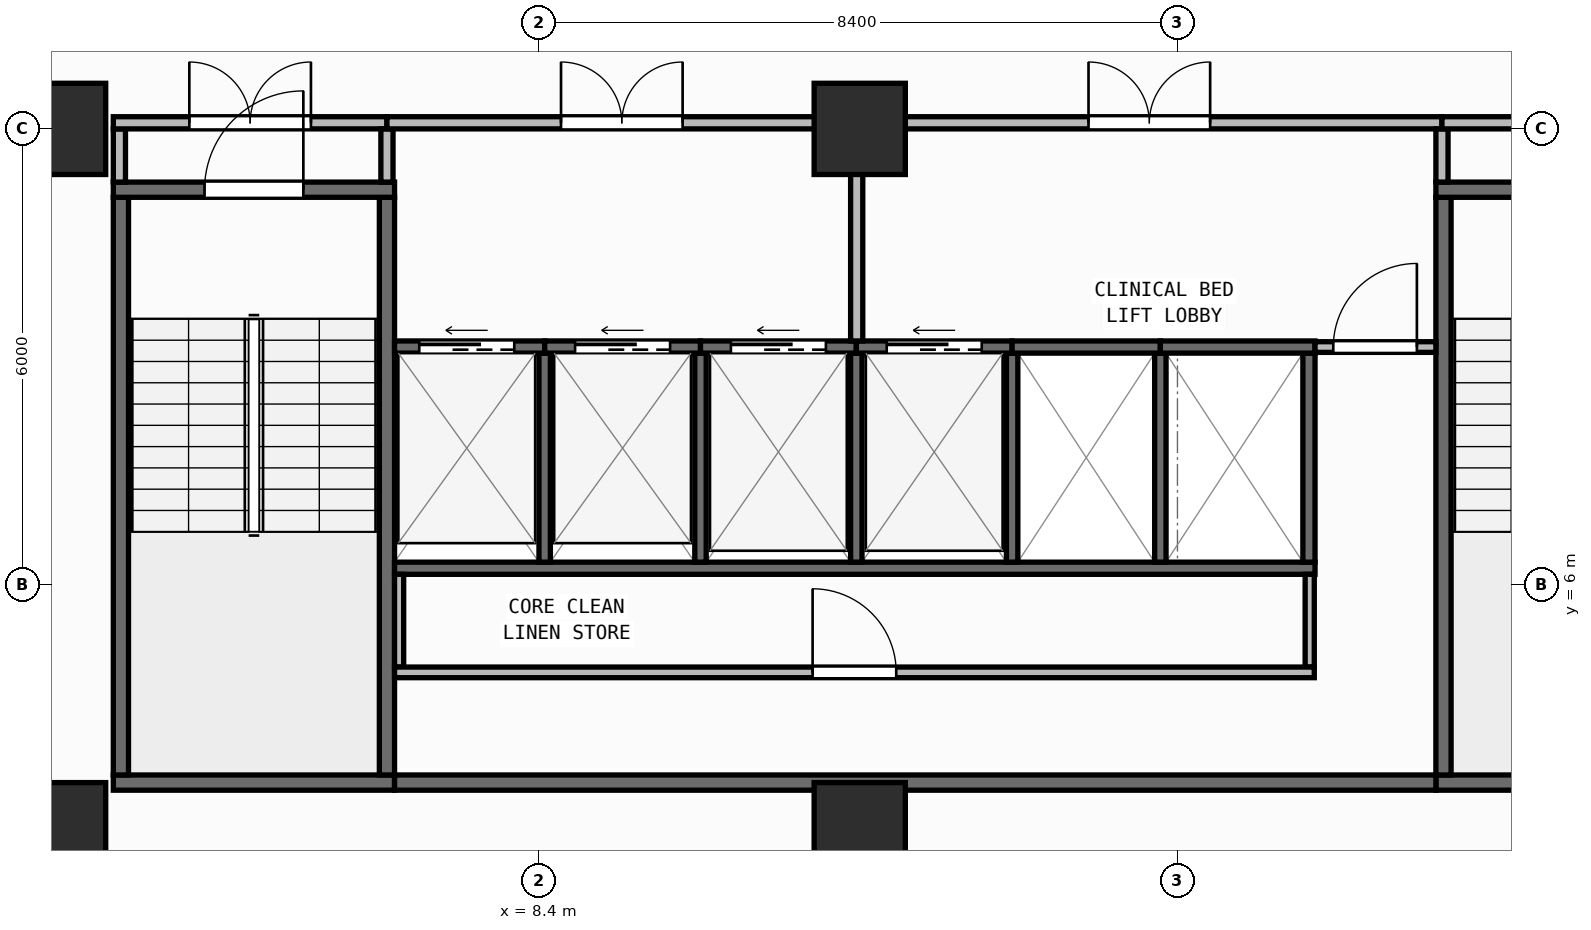
"""IFC4 building model, lengths in metres.
Left out: names, types, materials, properties, quantities, classifications, styles, units other than length and angle.
Written with IfcOpenShell. Run it as: python <this file> out.ifc"""

import sys

from ifc_helpers import new_model, si_unit, direction, frame, frame_2d, origin, origin_2d, place, context, subcontext, project, spatial, rectangle, extrude, element, fill, save


model = new_model("IFC4")
c1 = context("Model", 3, precision=1e-05, world=origin(), true_north=direction((0.0, 1.0)))
c2 = subcontext(c1, "Body", "Model", "MODEL_VIEW")
j1 = project(units=[si_unit("LENGTHUNIT", "METRE"), si_unit("PLANEANGLEUNIT", "RADIAN")], contexts=[c1])
p1 = place(None, origin())
s1 = spatial("IfcSite", under=j1, at=p1, CompositionType="ELEMENT")
p2 = place(p1, origin())
s2 = spatial("IfcBuilding", under=s1, at=p2, CompositionType="ELEMENT")
p3 = place(p2, frame((0.0, 0.0, 158.65)))
s3 = spatial("IfcBuildingStorey", under=s2, at=p3, CompositionType="ELEMENT", Elevation=158.65)
for number, where, z_axis, x_axis in (
    (1, (2.1, 2.8, 0.0), (0.0, 0.0, 1.0), (1.0, 0.0, 0.0)),
    (2, (12.62, 2.8, 0.0), (0.0, 0.0, 1.0), (1.0, 0.0, 0.0)),
    (3, (2.1, 12.0, 0.0), (0.0, 0.0, 1.0), (1.0, 0.0, 0.0)),
    (4, (12.62, 12.0, 0.0), (0.0, 0.0, 1.0), (1.0, 0.0, 0.0)),
):
    element("IfcColumn", number, at=place(p3, frame(where, z_axis=z_axis, x_axis=x_axis)), inside=s3, PredefinedType="COLUMN", context=c2, shape_type="SweptSolid", body=[
        extrude(rectangle(XDim=1.2, YDim=1.2, at=origin_2d()), origin(), (0.0, 0.0, 1.0), 3.95),
    ])
p4 = place(p3, frame((2.76, 0.173, 0.0), z_axis=(0.0, 0.0, 1.0), x_axis=(0.996857931723, 0.079210251617, 0.0)))
e5 = element("IfcWall", 5, at=p4, inside=s3, PredefinedType="STANDARD", context=c2, shape_type="SweptSolid", body=[
    extrude(rectangle(XDim=51.442, YDim=0.26, at=frame_2d((25.721, 0.0))), origin(), (0.0, 0.0, 1.0), 3.71),
])
p5 = place(p4, frame((24.521, 0.0, 0.9)))
e6 = element("IfcOpeningElement", 6, at=p5, cuts=e5, PredefinedType="OPENING", context=c2, shape_type="SweptSolid", body=[
    extrude(rectangle(XDim=2.4, YDim=1.65, at=frame_2d((1.2, 0.825))), frame((0.0, 0.14, 0.0), z_axis=(0.0, -1.0, 0.0), x_axis=(1.0, 0.0, 0.0)), (0.0, 0.0, 1.0), 0.28),
])
p6 = place(p3, frame((2.8, 3.4, 0.0), z_axis=(0.0, 0.0, 1.0), x_axis=(1.0, 0.0, 0.0)))
e7 = element("IfcWall", 7, at=p6, inside=s3, PredefinedType="SHEAR", context=c2, shape_type="SweptSolid", body=[
    extrude(rectangle(XDim=3.7, YDim=0.2, at=frame_2d((1.85, 0.0))), origin(), (0.0, 0.0, 1.0), 3.71),
])
for number, where, z_axis, x_axis in (
    (8, (2.9, 3.5, 0.0), (0.0, 0.0, 1.0), (0.0, 1.0, 0.0)),
    (9, (6.4, 3.5, 0.0), (0.0, 0.0, 1.0), (0.0, 1.0, 0.0)),
):
    element("IfcWall", number, at=place(p3, frame(where, z_axis=z_axis, x_axis=x_axis)), inside=s3, PredefinedType="SHEAR", context=c2, shape_type="SweptSolid", body=[
        extrude(rectangle(XDim=7.6, YDim=0.2, at=frame_2d((3.8, 0.0))), origin(), (0.0, 0.0, 1.0), 3.71),
    ])
p7 = place(p3, frame((2.8, 11.2, 0.0), z_axis=(0.0, 0.0, 1.0), x_axis=(1.0, 0.0, 0.0)))
e10 = element("IfcWall", 10, at=p7, inside=s3, PredefinedType="SHEAR", context=c2, shape_type="SweptSolid", body=[
    extrude(rectangle(XDim=3.7, YDim=0.2, at=frame_2d((1.85, 0.0))), origin(), (0.0, 0.0, 1.0), 3.71),
])
p8 = place(p7, frame((1.2, 0.0, 0.0)))
e11 = element("IfcOpeningElement", 11, at=p8, cuts=e10, PredefinedType="OPENING", context=c2, shape_type="SweptSolid", body=[
    extrude(rectangle(XDim=1.3, YDim=2.15, at=frame_2d((0.65, 1.075))), frame((0.0, 0.11, 0.0), z_axis=(0.0, -1.0, 0.0), x_axis=(1.0, 0.0, 0.0)), (0.0, 0.0, 1.0), 0.22),
])
p9 = place(p3, frame((20.2, 3.4, 0.0), z_axis=(0.0, 0.0, 1.0), x_axis=(1.0, 0.0, 0.0)))
e12 = element("IfcWall", 12, at=p9, inside=s3, PredefinedType="SHEAR", context=c2, shape_type="SweptSolid", body=[
    extrude(rectangle(XDim=3.7, YDim=0.2, at=frame_2d((1.85, 0.0))), origin(), (0.0, 0.0, 1.0), 3.71),
])
p10 = place(p3, frame((20.3, 3.5, 0.0), z_axis=(0.0, 0.0, 1.0), x_axis=(0.0, 1.0, 0.0)))
e13 = element("IfcWall", 13, at=p10, inside=s3, PredefinedType="SHEAR", context=c2, shape_type="SweptSolid", body=[
    extrude(rectangle(XDim=7.6, YDim=0.2, at=frame_2d((3.8, 0.0))), origin(), (0.0, 0.0, 1.0), 3.71),
])
p11 = place(p3, frame((20.2, 11.2, 0.0), z_axis=(0.0, 0.0, 1.0), x_axis=(1.0, 0.0, 0.0)))
e14 = element("IfcWall", 14, at=p11, inside=s3, PredefinedType="SHEAR", context=c2, shape_type="SweptSolid", body=[
    extrude(rectangle(XDim=3.7, YDim=0.2, at=frame_2d((1.85, 0.0))), origin(), (0.0, 0.0, 1.0), 3.71),
])
p12 = place(p11, frame((1.2, 0.0, 0.0)))
e15 = element("IfcOpeningElement", 15, at=p12, cuts=e14, PredefinedType="OPENING", context=c2, shape_type="SweptSolid", body=[
    extrude(rectangle(XDim=1.3, YDim=2.15, at=frame_2d((0.65, 1.075))), frame((0.0, 0.11, 0.0), z_axis=(0.0, -1.0, 0.0), x_axis=(1.0, 0.0, 0.0)), (0.0, 0.0, 1.0), 0.22),
])
p13 = place(p3, frame((6.5, 3.4, 0.0), z_axis=(0.0, 0.0, 1.0), x_axis=(1.0, 0.0, 0.0)))
e16 = element("IfcWall", 16, at=p13, inside=s3, PredefinedType="SHEAR", context=c2, shape_type="SweptSolid", body=[
    extrude(rectangle(XDim=13.7, YDim=0.2, at=frame_2d((6.85, 0.0))), origin(), (0.0, 0.0, 1.0), 3.71),
])
p14 = place(p3, frame((6.5, 6.22, 0.0), z_axis=(0.0, 0.0, 1.0), x_axis=(1.0, 0.0, 0.0)))
e17 = element("IfcWall", 17, at=p14, inside=s3, PredefinedType="SHEAR", context=c2, shape_type="SweptSolid", body=[
    extrude(rectangle(XDim=12.11, YDim=0.16, at=frame_2d((6.055, 0.0))), origin(), (0.0, 0.0, 1.0), 3.71),
])
p15 = place(p3, frame((18.53, 6.3, 0.0), z_axis=(0.0, 0.0, 1.0), x_axis=(0.0, 1.0, 0.0)))
e18 = element("IfcWall", 18, at=p15, inside=s3, PredefinedType="SHEAR", context=c2, shape_type="SweptSolid", body=[
    extrude(rectangle(XDim=2.75, YDim=0.16, at=frame_2d((1.375, 0.0))), origin(), (0.0, 0.0, 1.0), 3.71),
])
for number, where, z_axis, x_axis in (
    (19, (8.475, 6.3, 0.0), (0.0, 0.0, 1.0), (0.0, 1.0, 0.0)),
    (20, (10.525, 6.3, 0.0), (0.0, 0.0, 1.0), (0.0, 1.0, 0.0)),
    (21, (12.575, 6.3, 0.0), (0.0, 0.0, 1.0), (0.0, 1.0, 0.0)),
    (22, (14.625, 6.3, 0.0), (0.0, 0.0, 1.0), (0.0, 1.0, 0.0)),
    (23, (16.575, 6.3, 0.0), (0.0, 0.0, 1.0), (0.0, 1.0, 0.0)),
):
    element("IfcWall", number, at=place(p3, frame(where, z_axis=z_axis, x_axis=x_axis)), inside=s3, PredefinedType="SHEAR", context=c2, shape_type="SweptSolid", body=[
        extrude(rectangle(XDim=2.75, YDim=0.15, at=frame_2d((1.375, 0.0))), origin(), (0.0, 0.0, 1.0), 3.71),
    ])
p16 = place(p3, frame((6.5, 9.13, 0.0), z_axis=(0.0, 0.0, 1.0), x_axis=(1.0, 0.0, 0.0)))
e24 = element("IfcWall", 24, at=p16, inside=s3, PredefinedType="SHEAR", context=c2, shape_type="SweptSolid", body=[
    extrude(rectangle(XDim=1.975, YDim=0.16, at=frame_2d((0.988, 0.0))), origin(), (0.0, 0.0, 1.0), 3.71),
])
p17 = place(p16, frame((0.325, 0.0, 0.0)))
e25 = element("IfcOpeningElement", 25, at=p17, cuts=e24, PredefinedType="OPENING", context=c2, shape_type="SweptSolid", body=[
    extrude(rectangle(XDim=1.25, YDim=2.15, at=frame_2d((0.625, 1.075))), frame((0.0, 0.09, 0.0), z_axis=(0.0, -1.0, 0.0), x_axis=(1.0, 0.0, 0.0)), (0.0, 0.0, 1.0), 0.18),
])
p18 = place(p3, frame((8.475, 9.13, 0.0), z_axis=(0.0, 0.0, 1.0), x_axis=(1.0, 0.0, 0.0)))
e26 = element("IfcWall", 26, at=p18, inside=s3, PredefinedType="SHEAR", context=c2, shape_type="SweptSolid", body=[
    extrude(rectangle(XDim=2.05, YDim=0.16, at=frame_2d((1.025, 0.0))), origin(), (0.0, 0.0, 1.0), 3.71),
])
p19 = place(p18, frame((0.4, 0.0, 0.0)))
e27 = element("IfcOpeningElement", 27, at=p19, cuts=e26, PredefinedType="OPENING", context=c2, shape_type="SweptSolid", body=[
    extrude(rectangle(XDim=1.25, YDim=2.15, at=frame_2d((0.625, 1.075))), frame((0.0, 0.09, 0.0), z_axis=(0.0, -1.0, 0.0), x_axis=(1.0, 0.0, 0.0)), (0.0, 0.0, 1.0), 0.18),
])
p20 = place(p3, frame((10.525, 9.13, 0.0), z_axis=(0.0, 0.0, 1.0), x_axis=(1.0, 0.0, 0.0)))
e28 = element("IfcWall", 28, at=p20, inside=s3, PredefinedType="SHEAR", context=c2, shape_type="SweptSolid", body=[
    extrude(rectangle(XDim=2.05, YDim=0.16, at=frame_2d((1.025, 0.0))), origin(), (0.0, 0.0, 1.0), 3.71),
])
p21 = place(p20, frame((0.4, 0.0, 0.0)))
e29 = element("IfcOpeningElement", 29, at=p21, cuts=e28, PredefinedType="OPENING", context=c2, shape_type="SweptSolid", body=[
    extrude(rectangle(XDim=1.25, YDim=2.15, at=frame_2d((0.625, 1.075))), frame((0.0, 0.09, 0.0), z_axis=(0.0, -1.0, 0.0), x_axis=(1.0, 0.0, 0.0)), (0.0, 0.0, 1.0), 0.18),
])
p22 = place(p3, frame((12.575, 9.13, 0.0), z_axis=(0.0, 0.0, 1.0), x_axis=(1.0, 0.0, 0.0)))
e30 = element("IfcWall", 30, at=p22, inside=s3, PredefinedType="SHEAR", context=c2, shape_type="SweptSolid", body=[
    extrude(rectangle(XDim=2.05, YDim=0.16, at=frame_2d((1.025, 0.0))), origin(), (0.0, 0.0, 1.0), 3.71),
])
p23 = place(p22, frame((0.4, 0.0, 0.0)))
e31 = element("IfcOpeningElement", 31, at=p23, cuts=e30, PredefinedType="OPENING", context=c2, shape_type="SweptSolid", body=[
    extrude(rectangle(XDim=1.25, YDim=2.15, at=frame_2d((0.625, 1.075))), frame((0.0, 0.09, 0.0), z_axis=(0.0, -1.0, 0.0), x_axis=(1.0, 0.0, 0.0)), (0.0, 0.0, 1.0), 0.18),
])
p24 = place(p3, frame((14.625, 9.13, 0.0), z_axis=(0.0, 0.0, 1.0), x_axis=(1.0, 0.0, 0.0)))
e32 = element("IfcWall", 32, at=p24, inside=s3, PredefinedType="SHEAR", context=c2, shape_type="SweptSolid", body=[
    extrude(rectangle(XDim=1.95, YDim=0.16, at=frame_2d((0.975, 0.0))), origin(), (0.0, 0.0, 1.0), 3.71),
])
p25 = place(p3, frame((16.575, 9.13, 0.0), z_axis=(0.0, 0.0, 1.0), x_axis=(1.0, 0.0, 0.0)))
e33 = element("IfcWall", 33, at=p25, inside=s3, PredefinedType="SHEAR", context=c2, shape_type="SweptSolid", body=[
    extrude(rectangle(XDim=2.035, YDim=0.16, at=frame_2d((1.018, 0.0))), origin(), (0.0, 0.0, 1.0), 3.71),
])
for number, where, z_axis, x_axis in (
    (34, (6.56, 4.92, 0.0), (0.0, 0.0, 1.0), (0.0, 1.0, 0.0)),
    (35, (18.54, 4.92, 0.0), (0.0, 0.0, 1.0), (0.0, 1.0, 0.0)),
):
    element("IfcWall", number, at=place(p3, frame(where, z_axis=z_axis, x_axis=x_axis)), inside=s3, PredefinedType="PARTITIONING", context=c2, shape_type="SweptSolid", body=[
        extrude(rectangle(XDim=1.22, YDim=0.12, at=frame_2d((0.61, 0.0))), origin(), (0.0, 0.0, 1.0), 3.71),
    ])
p26 = place(p3, frame((6.5, 4.85, 0.0), z_axis=(0.0, 0.0, 1.0), x_axis=(1.0, 0.0, 0.0)))
e36 = element("IfcWall", 36, at=p26, inside=s3, PredefinedType="PARTITIONING", context=c2, shape_type="SweptSolid", body=[
    extrude(rectangle(XDim=12.1, YDim=0.14, at=frame_2d((6.05, 0.0))), origin(), (0.0, 0.0, 1.0), 3.71),
])
p27 = place(p26, frame((5.5, 0.0, 0.0)))
e37 = element("IfcOpeningElement", 37, at=p27, cuts=e36, PredefinedType="OPENING", context=c2, shape_type="SweptSolid", body=[
    extrude(rectangle(XDim=1.1, YDim=2.1, at=frame_2d((0.55, 1.05))), frame((0.0, 0.08, 0.0), z_axis=(0.0, -1.0, 0.0), x_axis=(1.0, 0.0, 0.0)), (0.0, 0.0, 1.0), 0.16),
])
p28 = place(p3, frame((18.61, 9.13, 0.0), z_axis=(0.0, 0.0, 1.0), x_axis=(1.0, 0.0, 0.0)))
e38 = element("IfcWall", 38, at=p28, inside=s3, PredefinedType="PARTITIONING", context=c2, shape_type="SweptSolid", body=[
    extrude(rectangle(XDim=1.59, YDim=0.14, at=frame_2d((0.795, 0.0))), origin(), (0.0, 0.0, 1.0), 3.71),
])
p29 = place(p28, frame((0.24, 0.0, 0.0)))
e39 = element("IfcOpeningElement", 39, at=p29, cuts=e38, PredefinedType="OPENING", context=c2, shape_type="SweptSolid", body=[
    extrude(rectangle(XDim=1.1, YDim=2.1, at=frame_2d((0.55, 1.05))), frame((0.0, 0.08, 0.0), z_axis=(0.0, -1.0, 0.0), x_axis=(1.0, 0.0, 0.0)), (0.0, 0.0, 1.0), 0.16),
])
p30 = place(p3, frame((2.88, 11.3, 0.0), z_axis=(0.0, 0.0, 1.0), x_axis=(0.0, 1.0, 0.0)))
e40 = element("IfcWall", 40, at=p30, inside=s3, PredefinedType="PARTITIONING", context=c2, shape_type="SweptSolid", body=[
    extrude(rectangle(XDim=0.7, YDim=0.16, at=frame_2d((0.35, 0.0))), origin(), (0.0, 0.0, 1.0), 3.71),
])
p31 = place(p3, frame((2.8, 12.08, 0.0), z_axis=(0.0, 0.0, 1.0), x_axis=(1.0, 0.0, 0.0)))
e41 = element("IfcWall", 41, at=p31, inside=s3, PredefinedType="PARTITIONING", context=c2, shape_type="SweptSolid", body=[
    extrude(rectangle(XDim=3.6, YDim=0.16, at=frame_2d((1.8, 0.0))), origin(), (0.0, 0.0, 1.0), 3.083),
])
p32 = place(p31, frame((1.0, 0.0, 0.0)))
e42 = element("IfcOpeningElement", 42, at=p32, cuts=e41, PredefinedType="OPENING", context=c2, shape_type="SweptSolid", body=[
    extrude(rectangle(XDim=1.6, YDim=2.05, at=frame_2d((0.8, 1.025))), frame((0.0, 0.09, 0.0), z_axis=(0.0, -1.0, 0.0), x_axis=(1.0, 0.0, 0.0)), (0.0, 0.0, 1.0), 0.18),
])
p33 = place(p3, frame((6.4, 11.3, 0.0), z_axis=(0.0, 0.0, 1.0), x_axis=(0.0, 1.0, 0.0)))
e43 = element("IfcWall", 43, at=p33, inside=s3, PredefinedType="PARTITIONING", context=c2, shape_type="SweptSolid", body=[
    extrude(rectangle(XDim=0.7, YDim=0.16, at=frame_2d((0.35, 0.0))), origin(), (0.0, 0.0, 1.0), 3.71),
])
p34 = place(p3, frame((6.4, 12.08, 0.0), z_axis=(0.0, 0.0, 1.0), x_axis=(1.0, 0.0, 0.0)))
e44 = element("IfcWall", 44, at=p34, inside=s3, PredefinedType="PARTITIONING", context=c2, shape_type="SweptSolid", body=[
    extrude(rectangle(XDim=6.18, YDim=0.16, at=frame_2d((3.09, 0.0))), origin(), (0.0, 0.0, 1.0), 3.083),
])
p35 = place(p34, frame((2.29, 0.0, 0.0)))
e45 = element("IfcOpeningElement", 45, at=p35, cuts=e44, PredefinedType="OPENING", context=c2, shape_type="SweptSolid", body=[
    extrude(rectangle(XDim=1.6, YDim=2.05, at=frame_2d((0.8, 1.025))), frame((0.0, 0.09, 0.0), z_axis=(0.0, -1.0, 0.0), x_axis=(1.0, 0.0, 0.0)), (0.0, 0.0, 1.0), 0.18),
])
p36 = place(p3, frame((12.58, 9.21, 0.0), z_axis=(0.0, 0.0, 1.0), x_axis=(0.0, 1.0, 0.0)))
e46 = element("IfcWall", 46, at=p36, inside=s3, PredefinedType="PARTITIONING", context=c2, shape_type="SweptSolid", body=[
    extrude(rectangle(XDim=2.79, YDim=0.16, at=frame_2d((1.395, 0.0))), origin(), (0.0, 0.0, 1.0), 3.71),
])
p37 = place(p3, frame((12.58, 12.08, 0.0), z_axis=(0.0, 0.0, 1.0), x_axis=(1.0, 0.0, 0.0)))
e47 = element("IfcWall", 47, at=p37, inside=s3, PredefinedType="PARTITIONING", context=c2, shape_type="SweptSolid", body=[
    extrude(rectangle(XDim=7.7, YDim=0.16, at=frame_2d((3.85, 0.0))), origin(), (0.0, 0.0, 1.0), 3.083),
])
p38 = place(p37, frame((3.05, 0.0, 0.0)))
e48 = element("IfcOpeningElement", 48, at=p38, cuts=e47, PredefinedType="OPENING", context=c2, shape_type="SweptSolid", body=[
    extrude(rectangle(XDim=1.6, YDim=2.05, at=frame_2d((0.8, 1.025))), frame((0.0, 0.09, 0.0), z_axis=(0.0, -1.0, 0.0), x_axis=(1.0, 0.0, 0.0)), (0.0, 0.0, 1.0), 0.18),
])
p39 = place(p3, frame((20.28, 11.3, 0.0), z_axis=(0.0, 0.0, 1.0), x_axis=(0.0, 1.0, 0.0)))
e49 = element("IfcWall", 49, at=p39, inside=s3, PredefinedType="PARTITIONING", context=c2, shape_type="SweptSolid", body=[
    extrude(rectangle(XDim=0.7, YDim=0.16, at=frame_2d((0.35, 0.0))), origin(), (0.0, 0.0, 1.0), 3.71),
])
p40 = place(p3, frame((20.28, 12.08, 0.0), z_axis=(0.0, 0.0, 1.0), x_axis=(1.0, 0.0, 0.0)))
e50 = element("IfcWall", 50, at=p40, inside=s3, PredefinedType="PARTITIONING", context=c2, shape_type="SweptSolid", body=[
    extrude(rectangle(XDim=3.62, YDim=0.16, at=frame_2d((1.81, 0.0))), origin(), (0.0, 0.0, 1.0), 3.083),
])
p41 = place(p40, frame((1.01, 0.0, 0.0)))
e51 = element("IfcOpeningElement", 51, at=p41, cuts=e50, PredefinedType="OPENING", context=c2, shape_type="SweptSolid", body=[
    extrude(rectangle(XDim=1.6, YDim=2.05, at=frame_2d((0.8, 1.025))), frame((0.0, 0.09, 0.0), z_axis=(0.0, -1.0, 0.0), x_axis=(1.0, 0.0, 0.0)), (0.0, 0.0, 1.0), 0.18),
])
p42 = place(p8, origin())
e52 = element("IfcDoor", 52, at=p42, inside=s3, OperationType="SINGLE_SWING_RIGHT", PredefinedType="DOOR", context=c2, shape_type="SweptSolid", body=[
    extrude(rectangle(XDim=1.3, YDim=2.15, at=frame_2d((0.65, 1.075))), frame((0.0, 0.025, 0.0), z_axis=(0.0, -1.0, 0.0), x_axis=(1.0, 0.0, 0.0)), (0.0, 0.0, 1.0), 0.05),
])
fill(e11, e52)
p43 = place(p17, origin())
e53 = element("IfcDoor", 53, at=p43, inside=s3, OperationType="SLIDING_TO_LEFT", PredefinedType="DOOR", context=c2, shape_type="SweptSolid", body=[
    extrude(rectangle(XDim=1.25, YDim=2.15, at=frame_2d((0.625, 1.075))), frame((0.0, 0.025, 0.0), z_axis=(0.0, -1.0, 0.0), x_axis=(1.0, 0.0, 0.0)), (0.0, 0.0, 1.0), 0.05),
])
fill(e25, e53)
p44 = place(p19, origin())
e54 = element("IfcDoor", 54, at=p44, inside=s3, OperationType="SLIDING_TO_LEFT", PredefinedType="DOOR", context=c2, shape_type="SweptSolid", body=[
    extrude(rectangle(XDim=1.25, YDim=2.15, at=frame_2d((0.625, 1.075))), frame((0.0, 0.025, 0.0), z_axis=(0.0, -1.0, 0.0), x_axis=(1.0, 0.0, 0.0)), (0.0, 0.0, 1.0), 0.05),
])
fill(e27, e54)
p45 = place(p21, origin())
e55 = element("IfcDoor", 55, at=p45, inside=s3, OperationType="SLIDING_TO_LEFT", PredefinedType="DOOR", context=c2, shape_type="SweptSolid", body=[
    extrude(rectangle(XDim=1.25, YDim=2.15, at=frame_2d((0.625, 1.075))), frame((0.0, 0.025, 0.0), z_axis=(0.0, -1.0, 0.0), x_axis=(1.0, 0.0, 0.0)), (0.0, 0.0, 1.0), 0.05),
])
fill(e29, e55)
p46 = place(p23, origin())
e56 = element("IfcDoor", 56, at=p46, inside=s3, OperationType="SLIDING_TO_LEFT", PredefinedType="DOOR", context=c2, shape_type="SweptSolid", body=[
    extrude(rectangle(XDim=1.25, YDim=2.15, at=frame_2d((0.625, 1.075))), frame((0.0, 0.025, 0.0), z_axis=(0.0, -1.0, 0.0), x_axis=(1.0, 0.0, 0.0)), (0.0, 0.0, 1.0), 0.05),
])
fill(e31, e56)
p47 = place(p27, origin())
e57 = element("IfcDoor", 57, at=p47, inside=s3, OperationType="SINGLE_SWING_LEFT", PredefinedType="DOOR", context=c2, shape_type="SweptSolid", body=[
    extrude(rectangle(XDim=1.1, YDim=2.1, at=frame_2d((0.55, 1.05))), frame((0.0, 0.025, 0.0), z_axis=(0.0, -1.0, 0.0), x_axis=(1.0, 0.0, 0.0)), (0.0, 0.0, 1.0), 0.05),
])
fill(e37, e57)
p48 = place(p29, origin())
e58 = element("IfcDoor", 58, at=p48, inside=s3, OperationType="SINGLE_SWING_RIGHT", PredefinedType="DOOR", context=c2, shape_type="SweptSolid", body=[
    extrude(rectangle(XDim=1.1, YDim=2.1, at=frame_2d((0.55, 1.05))), frame((0.0, 0.025, 0.0), z_axis=(0.0, -1.0, 0.0), x_axis=(1.0, 0.0, 0.0)), (0.0, 0.0, 1.0), 0.05),
])
fill(e39, e58)
p49 = place(p32, origin())
e59 = element("IfcDoor", 59, at=p49, inside=s3, OperationType="DOUBLE_DOOR_SINGLE_SWING", PredefinedType="DOOR", context=c2, shape_type="SweptSolid", body=[
    extrude(rectangle(XDim=1.6, YDim=2.05, at=frame_2d((0.8, 1.025))), frame((0.0, 0.025, 0.0), z_axis=(0.0, -1.0, 0.0), x_axis=(1.0, 0.0, 0.0)), (0.0, 0.0, 1.0), 0.05),
])
fill(e42, e59)
p50 = place(p35, origin())
e60 = element("IfcDoor", 60, at=p50, inside=s3, OperationType="DOUBLE_DOOR_SINGLE_SWING", PredefinedType="DOOR", context=c2, shape_type="SweptSolid", body=[
    extrude(rectangle(XDim=1.6, YDim=2.05, at=frame_2d((0.8, 1.025))), frame((0.0, 0.025, 0.0), z_axis=(0.0, -1.0, 0.0), x_axis=(1.0, 0.0, 0.0)), (0.0, 0.0, 1.0), 0.05),
])
fill(e45, e60)
p51 = place(p38, origin())
e61 = element("IfcDoor", 61, at=p51, inside=s3, OperationType="DOUBLE_DOOR_SINGLE_SWING", PredefinedType="DOOR", context=c2, shape_type="SweptSolid", body=[
    extrude(rectangle(XDim=1.6, YDim=2.05, at=frame_2d((0.8, 1.025))), frame((0.0, 0.025, 0.0), z_axis=(0.0, -1.0, 0.0), x_axis=(1.0, 0.0, 0.0)), (0.0, 0.0, 1.0), 0.05),
])
fill(e48, e61)
save(model, sys.argv[1])
